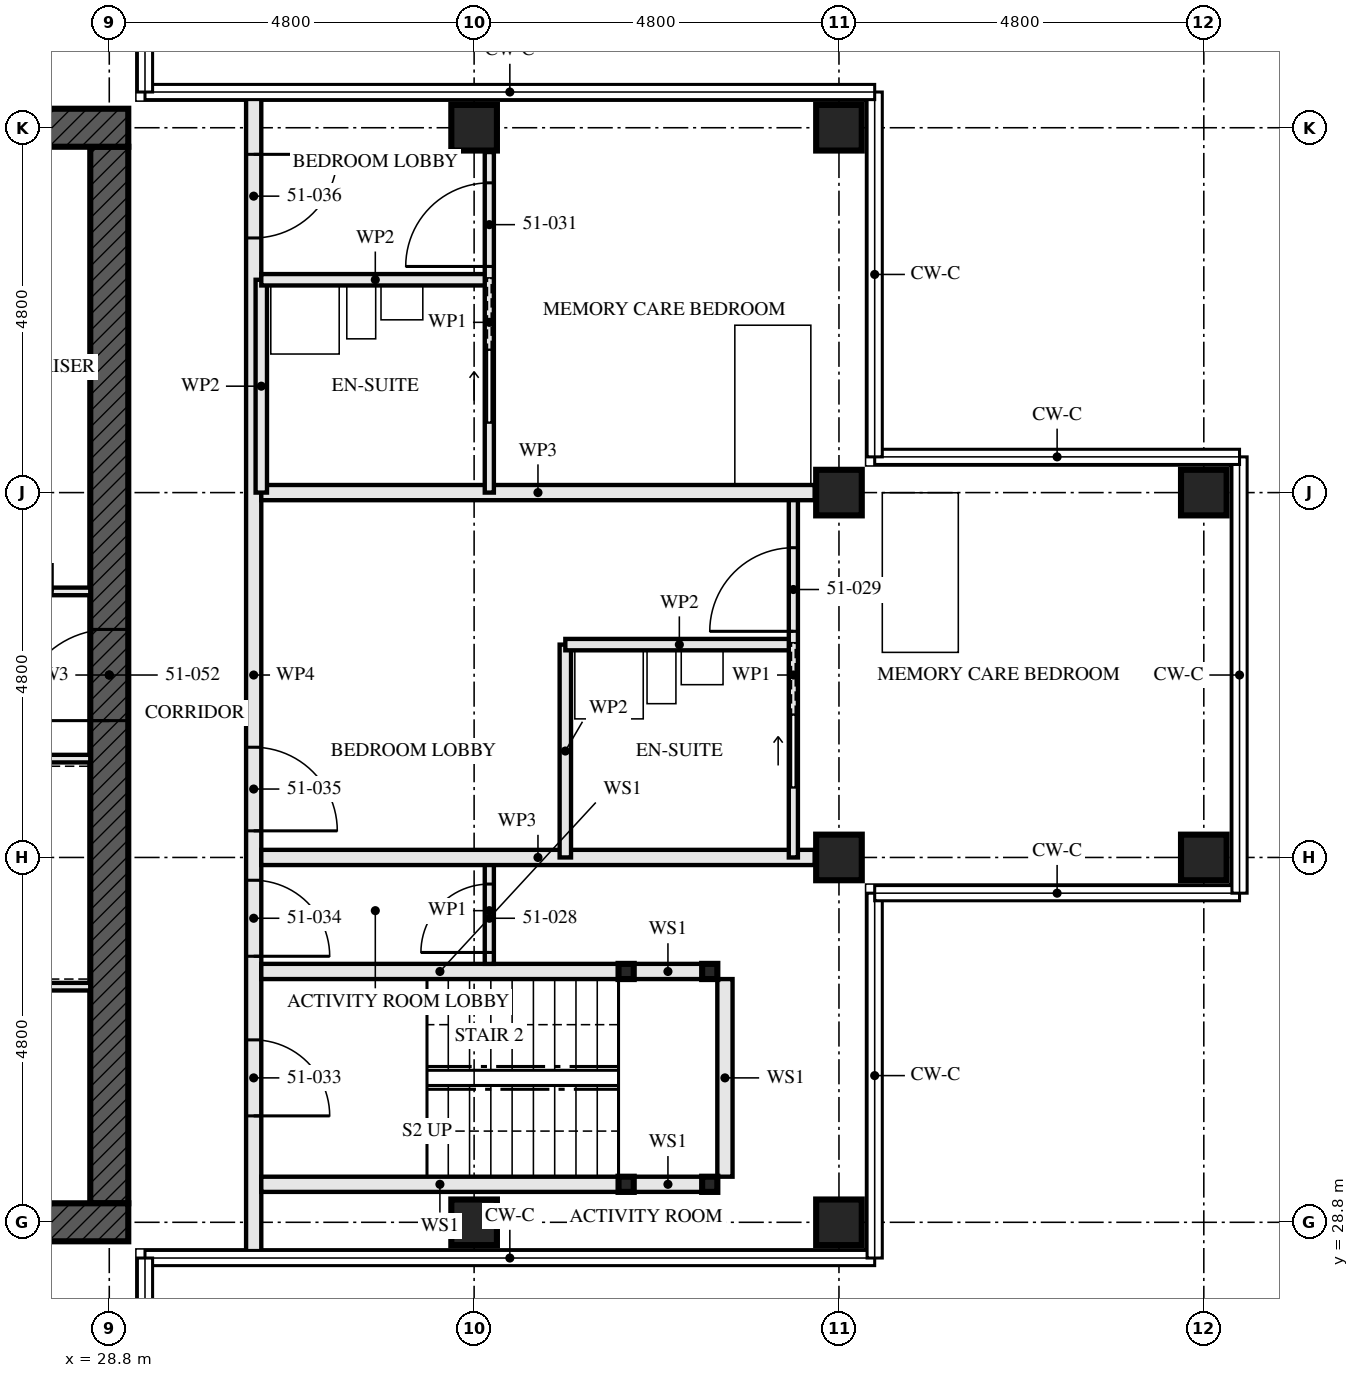
"""IFC4 building model, lengths in metres.
Left out: names, types, materials, properties, quantities, classifications, styles, units other than length and angle.
Written with IfcOpenShell. Run it as: python <this file> out.ifc"""

import sys

from ifc_helpers import new_model, si_unit, direction, frame, frame_2d, origin, origin_2d, place, context, subcontext, project, spatial, rectangle, hollow_rectangle, extrude, element, fill, save


model = new_model("IFC4")
c1 = context("Model", 3, precision=1e-05, world=origin(), true_north=direction((0.0, 1.0)))
c2 = subcontext(c1, "Body", "Model", "MODEL_VIEW")
j1 = project(units=[si_unit("LENGTHUNIT", "METRE"), si_unit("PLANEANGLEUNIT", "RADIAN")], contexts=[c1])
p1 = place(None, origin())
s1 = spatial("IfcSite", under=j1, at=p1, CompositionType="ELEMENT")
p2 = place(p1, origin())
s2 = spatial("IfcBuilding", under=s1, at=p2, CompositionType="ELEMENT")
p3 = place(p2, frame((0.0, 0.0, 186.5)))
s3 = spatial("IfcBuildingStorey", under=s2, at=p3, CompositionType="ELEMENT", Elevation=186.5)
for number, where, z_axis, x_axis in (
    (1, (33.6, 28.8, 0.0), (0.0, 0.0, 1.0), (0.0, 1.0, 0.0)),
    (2, (33.6, 43.2, 0.0), (0.0, 0.0, 1.0), (0.0, 1.0, 0.0)),
    (3, (38.4, 28.8, 0.0), (0.0, 0.0, 1.0), (0.0, 1.0, 0.0)),
    (4, (38.4, 33.6, 0.0), (0.0, 0.0, 1.0), (0.0, 1.0, 0.0)),
    (5, (38.4, 38.4, 0.0), (0.0, 0.0, 1.0), (0.0, 1.0, 0.0)),
    (6, (38.4, 43.2, 0.0), (0.0, 0.0, 1.0), (0.0, 1.0, 0.0)),
    (7, (43.2, 33.6, 0.0), (0.0, 0.0, 1.0), (0.0, 1.0, 0.0)),
    (8, (43.2, 38.4, 0.0), (0.0, 0.0, 1.0), (0.0, 1.0, 0.0)),
):
    element("IfcColumn", number, at=place(p3, frame(where, z_axis=z_axis, x_axis=x_axis)), inside=s3, PredefinedType="COLUMN", context=c2, shape_type="SweptSolid", body=[
        extrude(hollow_rectangle(XDim=0.6, YDim=0.6, WallThickness=0.08, at=origin_2d()), origin(), (0.0, 0.0, 1.0), 3.5),
    ])
p4 = place(p3, frame((14.15, 28.8, -0.17), z_axis=(0.0, 0.0, 1.0), x_axis=(1.0, 0.0, 0.0)))
e9 = element("IfcWall", 9, at=p4, inside=s3, PredefinedType="SHEAR", context=c2, shape_type="SweptSolid", body=[
    extrude(rectangle(XDim=14.9, YDim=0.5, at=frame_2d((7.45, 0.0))), origin(), (0.0, 0.0, 1.0), 3.42),
])
p5 = place(p4, frame((6.85, 0.0, 0.17)))
e10 = element("IfcOpeningElement", 10, at=p5, cuts=e9, PredefinedType="OPENING", context=c2, shape_type="SweptSolid", body=[
    extrude(rectangle(XDim=1.2, YDim=2.1, at=frame_2d((0.6, 1.05))), frame((0.0, 0.26, 0.0), z_axis=(0.0, -1.0, 0.0), x_axis=(1.0, 0.0, 0.0)), (0.0, 0.0, 1.0), 0.521),
])
p6 = place(p3, frame((29.05, 43.2, -0.17), z_axis=(0.0, 0.0, 1.0), x_axis=(-1.0, 0.0, 0.0)))
e11 = element("IfcWall", 11, at=p6, inside=s3, PredefinedType="SHEAR", context=c2, shape_type="SweptSolid", body=[
    extrude(rectangle(XDim=14.9, YDim=0.5, at=frame_2d((7.45, 0.0))), origin(), (0.0, 0.0, 1.0), 3.42),
])
p7 = place(p6, frame((6.85, 0.0, 0.17)))
e12 = element("IfcOpeningElement", 12, at=p7, cuts=e11, PredefinedType="OPENING", context=c2, shape_type="SweptSolid", body=[
    extrude(rectangle(XDim=1.2, YDim=2.1, at=frame_2d((0.6, 1.05))), frame((0.0, 0.26, 0.0), z_axis=(0.0, -1.0, 0.0), x_axis=(1.0, 0.0, 0.0)), (0.0, 0.0, 1.0), 0.521),
])
p8 = place(p3, frame((28.8, 29.05, -0.17), z_axis=(0.0, 0.0, 1.0), x_axis=(0.0, 1.0, 0.0)))
e13 = element("IfcWall", 13, at=p8, inside=s3, PredefinedType="SHEAR", context=c2, shape_type="SweptSolid", body=[
    extrude(rectangle(XDim=13.9, YDim=0.5, at=frame_2d((6.95, 0.0))), origin(), (0.0, 0.0, 1.0), 3.42),
])
p9 = place(p8, frame((6.35, 0.0, 0.17)))
e14 = element("IfcOpeningElement", 14, at=p9, cuts=e13, PredefinedType="OPENING", context=c2, shape_type="SweptSolid", body=[
    extrude(rectangle(XDim=1.2, YDim=2.1, at=frame_2d((0.6, 1.05))), frame((0.0, 0.26, 0.0), z_axis=(0.0, -1.0, 0.0), x_axis=(1.0, 0.0, 0.0)), (0.0, 0.0, 1.0), 0.521),
])
for number, where, z_axis, x_axis in (
    (15, (36.7, 29.3, 0.0), (0.0, 0.0, 1.0), (1.0, 0.0, 0.0)),
    (16, (36.7, 32.1, 0.0), (0.0, 0.0, 1.0), (1.0, 0.0, 0.0)),
    (17, (35.6, 29.3, 0.0), (0.0, 0.0, 1.0), (1.0, 0.0, 0.0)),
    (18, (35.6, 32.1, 0.0), (0.0, 0.0, 1.0), (1.0, 0.0, 0.0)),
):
    element("IfcColumn", number, at=place(p3, frame(where, z_axis=z_axis, x_axis=x_axis)), inside=s3, PredefinedType="COLUMN", context=c2, shape_type="SweptSolid", body=[
        extrude(hollow_rectangle(XDim=0.2, YDim=0.2, WallThickness=0.008, at=origin_2d()), origin(), (0.0, 0.0, 1.0), 3.25),
    ])
p10 = place(p3, frame((36.6, 29.3, 0.0), z_axis=(0.0, 0.0, 1.0), x_axis=(-1.0, 0.0, 0.0)))
e19 = element("IfcWall", 19, at=p10, inside=s3, PredefinedType="SOLIDWALL", context=c2, shape_type="SweptSolid", body=[
    extrude(rectangle(XDim=0.9, YDim=0.2, at=frame_2d((0.45, 0.0))), origin(), (0.0, 0.0, 1.0), 2.94),
])
p11 = place(p3, frame((35.5, 29.3, 0.0), z_axis=(0.0, 0.0, 1.0), x_axis=(-1.0, 0.0, 0.0)))
e20 = element("IfcWall", 20, at=p11, inside=s3, PredefinedType="SOLIDWALL", context=c2, shape_type="SweptSolid", body=[
    extrude(rectangle(XDim=4.7, YDim=0.2, at=frame_2d((2.35, 0.0))), origin(), (0.0, 0.0, 1.0), 2.94),
])
p12 = place(p3, frame((36.6, 32.1, 0.0), z_axis=(0.0, 0.0, 1.0), x_axis=(-1.0, 0.0, 0.0)))
e21 = element("IfcWall", 21, at=p12, inside=s3, PredefinedType="SOLIDWALL", context=c2, shape_type="SweptSolid", body=[
    extrude(rectangle(XDim=0.9, YDim=0.2, at=frame_2d((0.45, 0.0))), origin(), (0.0, 0.0, 1.0), 2.94),
])
p13 = place(p3, frame((35.5, 32.1, 0.0), z_axis=(0.0, 0.0, 1.0), x_axis=(-1.0, 0.0, 0.0)))
e22 = element("IfcWall", 22, at=p13, inside=s3, PredefinedType="SOLIDWALL", context=c2, shape_type="SweptSolid", body=[
    extrude(rectangle(XDim=4.7, YDim=0.2, at=frame_2d((2.35, 0.0))), origin(), (0.0, 0.0, 1.0), 2.94),
])
p14 = place(p3, frame((36.9, 29.4, 0.0), z_axis=(0.0, 0.0, 1.0), x_axis=(0.0, 1.0, 0.0)))
e23 = element("IfcWall", 23, at=p14, inside=s3, PredefinedType="SOLIDWALL", context=c2, shape_type="SweptSolid", body=[
    extrude(rectangle(XDim=2.6, YDim=0.2, at=frame_2d((1.3, 0.0))), origin(), (0.0, 0.0, 1.0), 3.25),
])
p15 = place(p3, frame((33.8, 32.2, 0.0), z_axis=(0.0, 0.0, 1.0), x_axis=(0.0, 1.0, 0.0)))
e24 = element("IfcWall", 24, at=p15, inside=s3, PredefinedType="PARTITIONING", context=c2, shape_type="SweptSolid", body=[
    extrude(rectangle(XDim=1.4, YDim=0.12, at=frame_2d((0.7, 0.0))), origin(), (0.0, 0.0, 1.0), 3.25),
])
p16 = place(p15, frame((0.15, 0.0, 0.0)))
e25 = element("IfcOpeningElement", 25, at=p16, cuts=e24, PredefinedType="OPENING", context=c2, shape_type="SweptSolid", body=[
    extrude(rectangle(XDim=0.9, YDim=2.1, at=frame_2d((0.45, 1.05))), frame((0.0, 0.071, 0.0), z_axis=(0.0, -1.0, 0.0), x_axis=(1.0, 0.0, 0.0)), (0.0, 0.0, 1.0), 0.141),
])
p17 = place(p3, frame((38.08, 33.6, 0.0), z_axis=(0.0, 0.0, 1.0), x_axis=(-1.0, 0.0, 0.0)))
e26 = element("IfcWall", 26, at=p17, inside=s3, PredefinedType="PARTITIONING", context=c2, shape_type="SweptSolid", body=[
    extrude(rectangle(XDim=7.28, YDim=0.2, at=frame_2d((3.64, 0.0))), origin(), (0.0, 0.0, 1.0), 2.24),
])
p18 = place(p3, frame((37.8, 36.4, 0.0), z_axis=(0.0, 0.0, 1.0), x_axis=(-1.0, 0.0, 0.0)))
e27 = element("IfcWall", 27, at=p18, inside=s3, PredefinedType="PARTITIONING", context=c2, shape_type="SweptSolid", body=[
    extrude(rectangle(XDim=3.0, YDim=0.15, at=frame_2d((1.5, 0.0))), origin(), (0.0, 0.0, 1.0), 3.25),
])
p19 = place(p3, frame((34.8, 33.6, 0.0), z_axis=(0.0, 0.0, 1.0), x_axis=(0.0, 1.0, 0.0)))
e28 = element("IfcWall", 28, at=p19, inside=s3, PredefinedType="PARTITIONING", context=c2, shape_type="SweptSolid", body=[
    extrude(rectangle(XDim=2.8, YDim=0.15, at=frame_2d((1.4, 0.0))), origin(), (0.0, 0.0, 1.0), 3.25),
])
p20 = place(p3, frame((37.8, 33.6, 0.0), z_axis=(0.0, 0.0, 1.0), x_axis=(0.0, 1.0, 0.0)))
e29 = element("IfcWall", 29, at=p20, inside=s3, PredefinedType="PARTITIONING", context=c2, shape_type="SweptSolid", body=[
    extrude(rectangle(XDim=4.8, YDim=0.12, at=frame_2d((2.4, 0.0))), origin(), (0.0, 0.0, 1.0), 3.25),
])
p21 = place(p20, frame((2.975, 0.0, 0.0)))
e30 = element("IfcOpeningElement", 30, at=p21, cuts=e29, PredefinedType="OPENING", context=c2, shape_type="SweptSolid", body=[
    extrude(rectangle(XDim=1.1, YDim=2.1, at=frame_2d((0.55, 1.05))), frame((0.0, 0.071, 0.0), z_axis=(0.0, -1.0, 0.0), x_axis=(1.0, 0.0, 0.0)), (0.0, 0.0, 1.0), 0.141),
])
p22 = place(p20, frame((0.925, 0.0, 0.0)))
e31 = element("IfcOpeningElement", 31, at=p22, cuts=e29, PredefinedType="OPENING", context=c2, shape_type="SweptSolid", body=[
    extrude(rectangle(XDim=0.95, YDim=2.1, at=frame_2d((0.475, 1.05))), frame((0.0, 0.071, 0.0), z_axis=(0.0, -1.0, 0.0), x_axis=(1.0, 0.0, 0.0)), (0.0, 0.0, 1.0), 0.141),
])
p23 = place(p3, frame((38.08, 38.4, 0.0), z_axis=(0.0, 0.0, 1.0), x_axis=(-1.0, 0.0, 0.0)))
e32 = element("IfcWall", 32, at=p23, inside=s3, PredefinedType="PARTITIONING", context=c2, shape_type="SweptSolid", body=[
    extrude(rectangle(XDim=7.28, YDim=0.2, at=frame_2d((3.64, 0.0))), origin(), (0.0, 0.0, 1.0), 2.24),
])
p24 = place(p3, frame((33.8, 41.2, 0.0), z_axis=(0.0, 0.0, 1.0), x_axis=(-1.0, 0.0, 0.0)))
e33 = element("IfcWall", 33, at=p24, inside=s3, PredefinedType="PARTITIONING", context=c2, shape_type="SweptSolid", body=[
    extrude(rectangle(XDim=3.0, YDim=0.15, at=frame_2d((1.5, 0.0))), origin(), (0.0, 0.0, 1.0), 3.25),
])
p25 = place(p3, frame((30.8, 38.4, 0.0), z_axis=(0.0, 0.0, 1.0), x_axis=(0.0, 1.0, 0.0)))
e34 = element("IfcWall", 34, at=p25, inside=s3, PredefinedType="PARTITIONING", context=c2, shape_type="SweptSolid", body=[
    extrude(rectangle(XDim=2.8, YDim=0.15, at=frame_2d((1.4, 0.0))), origin(), (0.0, 0.0, 1.0), 3.25),
])
p26 = place(p3, frame((33.8, 38.4, 0.0), z_axis=(0.0, 0.0, 1.0), x_axis=(0.0, 1.0, 0.0)))
e35 = element("IfcWall", 35, at=p26, inside=s3, PredefinedType="PARTITIONING", context=c2, shape_type="SweptSolid", body=[
    extrude(rectangle(XDim=4.48, YDim=0.12, at=frame_2d((2.24, 0.0))), origin(), (0.0, 0.0, 1.0), 3.25),
])
p27 = place(p26, frame((2.975, 0.0, 0.0)))
e36 = element("IfcOpeningElement", 36, at=p27, cuts=e35, PredefinedType="OPENING", context=c2, shape_type="SweptSolid", body=[
    extrude(rectangle(XDim=1.1, YDim=2.1, at=frame_2d((0.55, 1.05))), frame((0.0, 0.071, 0.0), z_axis=(0.0, -1.0, 0.0), x_axis=(1.0, 0.0, 0.0)), (0.0, 0.0, 1.0), 0.141),
])
p28 = place(p26, frame((0.925, 0.0, 0.0)))
e37 = element("IfcOpeningElement", 37, at=p28, cuts=e35, PredefinedType="OPENING", context=c2, shape_type="SweptSolid", body=[
    extrude(rectangle(XDim=0.95, YDim=2.1, at=frame_2d((0.475, 1.05))), frame((0.0, 0.071, 0.0), z_axis=(0.0, -1.0, 0.0), x_axis=(1.0, 0.0, 0.0)), (0.0, 0.0, 1.0), 0.141),
])
p29 = place(p3, frame((30.7, 28.35, 0.0), z_axis=(0.0, 0.0, 1.0), x_axis=(0.0, 1.0, 0.0)))
e38 = element("IfcWall", 38, at=p29, inside=s3, PredefinedType="PARTITIONING", context=c2, shape_type="SweptSolid", body=[
    extrude(rectangle(XDim=15.3, YDim=0.2, at=frame_2d((7.65, 0.0))), origin(), (0.0, 0.0, 1.0), 2.04),
])
p30 = place(p29, frame((1.85, 0.0, 0.0)))
e39 = element("IfcOpeningElement", 39, at=p30, cuts=e38, PredefinedType="OPENING", context=c2, shape_type="SweptSolid", body=[
    extrude(rectangle(XDim=1.0, YDim=2.0, at=frame_2d((0.5, 1.0))), frame((0.0, 0.111, 0.0), z_axis=(0.0, -1.0, 0.0), x_axis=(1.0, 0.0, 0.0)), (0.0, 0.0, 1.0), 0.221),
])
p31 = place(p29, frame((3.95, 0.0, 0.0)))
e40 = element("IfcOpeningElement", 40, at=p31, cuts=e38, PredefinedType="OPENING", context=c2, shape_type="SweptSolid", body=[
    extrude(rectangle(XDim=1.0, YDim=2.0, at=frame_2d((0.5, 1.0))), frame((0.0, 0.111, 0.0), z_axis=(0.0, -1.0, 0.0), x_axis=(1.0, 0.0, 0.0)), (0.0, 0.0, 1.0), 0.221),
])
p32 = place(p29, frame((5.6, 0.0, 0.0)))
e41 = element("IfcOpeningElement", 41, at=p32, cuts=e38, PredefinedType="OPENING", context=c2, shape_type="SweptSolid", body=[
    extrude(rectangle(XDim=1.1, YDim=2.0, at=frame_2d((0.55, 1.0))), frame((0.0, 0.111, 0.0), z_axis=(0.0, -1.0, 0.0), x_axis=(1.0, 0.0, 0.0)), (0.0, 0.0, 1.0), 0.221),
])
p33 = place(p29, frame((13.4, 0.0, 0.0)))
e42 = element("IfcOpeningElement", 42, at=p33, cuts=e38, PredefinedType="OPENING", context=c2, shape_type="SweptSolid", body=[
    extrude(rectangle(XDim=1.1, YDim=2.0, at=frame_2d((0.55, 1.0))), frame((0.0, 0.111, 0.0), z_axis=(0.0, -1.0, 0.0), x_axis=(1.0, 0.0, 0.0)), (0.0, 0.0, 1.0), 0.221),
])
p34 = place(p3, frame((23.05, 34.9, 0.0), z_axis=(0.0, 0.0, 1.0), x_axis=(1.0, 0.0, 0.0)))
e43 = element("IfcWall", 43, at=p34, inside=s3, PredefinedType="SOLIDWALL", context=c2, shape_type="SweptSolid", body=[
    extrude(rectangle(XDim=5.5, YDim=0.1, at=frame_2d((2.75, 0.0))), origin(), (0.0, 0.0, 1.0), 3.25),
])
p35 = place(p34, frame((0.85, 0.0, 0.0)))
e44 = element("IfcOpeningElement", 44, at=p35, cuts=e43, PredefinedType="OPENING", context=c2, shape_type="SweptSolid", body=[
    extrude(rectangle(XDim=1.0, YDim=2.1, at=frame_2d((0.5, 1.05))), frame((0.0, 0.061, 0.0), z_axis=(0.0, -1.0, 0.0), x_axis=(1.0, 0.0, 0.0)), (0.0, 0.0, 1.0), 0.121),
])
p36 = place(p34, frame((3.625, 0.0, 0.0)))
e45 = element("IfcOpeningElement", 45, at=p36, cuts=e43, PredefinedType="OPENING", context=c2, shape_type="SweptSolid", body=[
    extrude(rectangle(XDim=1.0, YDim=2.1, at=frame_2d((0.5, 1.05))), frame((0.0, 0.061, 0.0), z_axis=(0.0, -1.0, 0.0), x_axis=(1.0, 0.0, 0.0)), (0.0, 0.0, 1.0), 0.121),
])
p37 = place(p3, frame((22.65, 37.1, 0.0), z_axis=(0.0, 0.0, 1.0), x_axis=(1.0, 0.0, 0.0)))
e46 = element("IfcWall", 46, at=p37, inside=s3, PredefinedType="SOLIDWALL", context=c2, shape_type="SweptSolid", body=[
    extrude(rectangle(XDim=5.9, YDim=0.1, at=frame_2d((2.95, 0.0))), origin(), (0.0, 0.0, 1.0), 3.25),
])
p38 = place(p37, frame((3.15, 0.0, 0.0)))
e47 = element("IfcOpeningElement", 47, at=p38, cuts=e46, PredefinedType="OPENING", context=c2, shape_type="SweptSolid", body=[
    extrude(rectangle(XDim=0.9, YDim=2.1, at=frame_2d((0.45, 1.05))), frame((0.0, 0.061, 0.0), z_axis=(0.0, -1.0, 0.0), x_axis=(1.0, 0.0, 0.0)), (0.0, 0.0, 1.0), 0.121),
])
p39 = place(p37, frame((4.7, 0.0, 0.0)))
e48 = element("IfcOpeningElement", 48, at=p39, cuts=e46, PredefinedType="OPENING", context=c2, shape_type="SweptSolid", body=[
    extrude(rectangle(XDim=0.7, YDim=2.1, at=frame_2d((0.35, 1.05))), frame((0.0, 0.061, 0.0), z_axis=(0.0, -1.0, 0.0), x_axis=(1.0, 0.0, 0.0)), (0.0, 0.0, 1.0), 0.121),
])
p40 = place(p3, frame((23.15, 31.9, 0.0), z_axis=(0.0, 0.0, 1.0), x_axis=(1.0, 0.0, 0.0)))
e49 = element("IfcWall", 49, at=p40, inside=s3, PredefinedType="SOLIDWALL", context=c2, shape_type="SweptSolid", body=[
    extrude(rectangle(XDim=5.4, YDim=0.1, at=frame_2d((2.7, 0.0))), origin(), (0.0, 0.0, 1.0), 3.25),
])
p41 = place(p16, origin())
e50 = element("IfcDoor", 50, at=p41, inside=s3, OperationType="SINGLE_SWING_RIGHT", PredefinedType="DOOR", context=c2, shape_type="SweptSolid", body=[
    extrude(rectangle(XDim=0.9, YDim=2.1, at=frame_2d((0.45, 1.05))), frame((0.0, 0.022, 0.0), z_axis=(0.0, -1.0, 0.0), x_axis=(1.0, 0.0, 0.0)), (0.0, 0.0, 1.0), 0.044),
])
fill(e25, e50)
p42 = place(p21, origin())
e51 = element("IfcDoor", 51, at=p42, inside=s3, OperationType="SINGLE_SWING_RIGHT", PredefinedType="DOOR", context=c2, shape_type="SweptSolid", body=[
    extrude(rectangle(XDim=1.1, YDim=2.1, at=frame_2d((0.55, 1.05))), frame((0.0, 0.022, 0.0), z_axis=(0.0, -1.0, 0.0), x_axis=(1.0, 0.0, 0.0)), (0.0, 0.0, 1.0), 0.044),
])
fill(e30, e51)
p43 = place(p22, origin())
e52 = element("IfcDoor", 52, at=p43, inside=s3, OperationType="SLIDING_TO_LEFT", PredefinedType="DOOR", context=c2, shape_type="SweptSolid", body=[
    extrude(rectangle(XDim=0.95, YDim=2.1, at=frame_2d((0.475, 1.05))), frame((0.0, 0.022, 0.0), z_axis=(0.0, -1.0, 0.0), x_axis=(1.0, 0.0, 0.0)), (0.0, 0.0, 1.0), 0.044),
])
fill(e31, e52)
p44 = place(p27, origin())
e53 = element("IfcDoor", 53, at=p44, inside=s3, OperationType="SINGLE_SWING_RIGHT", PredefinedType="DOOR", context=c2, shape_type="SweptSolid", body=[
    extrude(rectangle(XDim=1.1, YDim=2.1, at=frame_2d((0.55, 1.05))), frame((0.0, 0.022, 0.0), z_axis=(0.0, -1.0, 0.0), x_axis=(1.0, 0.0, 0.0)), (0.0, 0.0, 1.0), 0.044),
])
fill(e36, e53)
p45 = place(p28, origin())
e54 = element("IfcDoor", 54, at=p45, inside=s3, OperationType="SLIDING_TO_LEFT", PredefinedType="DOOR", context=c2, shape_type="SweptSolid", body=[
    extrude(rectangle(XDim=0.95, YDim=2.1, at=frame_2d((0.475, 1.05))), frame((0.0, 0.022, 0.0), z_axis=(0.0, -1.0, 0.0), x_axis=(1.0, 0.0, 0.0)), (0.0, 0.0, 1.0), 0.044),
])
fill(e37, e54)
p46 = place(p30, frame((1.0, 0.0, 0.0), z_axis=(0.0, 0.0, 1.0), x_axis=(-1.0, 0.0, 0.0)))
e55 = element("IfcDoor", 55, at=p46, inside=s3, OperationType="SINGLE_SWING_LEFT", PredefinedType="DOOR", context=c2, shape_type="SweptSolid", body=[
    extrude(rectangle(XDim=1.0, YDim=2.0, at=frame_2d((0.5, 1.0))), frame((0.0, 0.032, 0.0), z_axis=(0.0, -1.0, 0.0), x_axis=(1.0, 0.0, 0.0)), (0.0, 0.0, 1.0), 0.064),
])
fill(e39, e55)
p47 = place(p31, frame((1.0, 0.0, 0.0), z_axis=(0.0, 0.0, 1.0), x_axis=(-1.0, 0.0, 0.0)))
e56 = element("IfcDoor", 56, at=p47, inside=s3, OperationType="SINGLE_SWING_LEFT", PredefinedType="DOOR", context=c2, shape_type="SweptSolid", body=[
    extrude(rectangle(XDim=1.0, YDim=2.0, at=frame_2d((0.5, 1.0))), frame((0.0, 0.027, 0.0), z_axis=(0.0, -1.0, 0.0), x_axis=(1.0, 0.0, 0.0)), (0.0, 0.0, 1.0), 0.054),
])
fill(e40, e56)
p48 = place(p32, frame((1.1, 0.0, 0.0), z_axis=(0.0, 0.0, 1.0), x_axis=(-1.0, 0.0, 0.0)))
e57 = element("IfcDoor", 57, at=p48, inside=s3, OperationType="SINGLE_SWING_LEFT", PredefinedType="DOOR", context=c2, shape_type="SweptSolid", body=[
    extrude(rectangle(XDim=1.1, YDim=2.0, at=frame_2d((0.55, 1.0))), frame((0.0, 0.027, 0.0), z_axis=(0.0, -1.0, 0.0), x_axis=(1.0, 0.0, 0.0)), (0.0, 0.0, 1.0), 0.054),
])
fill(e41, e57)
p49 = place(p33, frame((1.1, 0.0, 0.0), z_axis=(0.0, 0.0, 1.0), x_axis=(-1.0, 0.0, 0.0)))
e58 = element("IfcDoor", 58, at=p49, inside=s3, OperationType="SINGLE_SWING_RIGHT", PredefinedType="DOOR", context=c2, shape_type="SweptSolid", body=[
    extrude(rectangle(XDim=1.1, YDim=2.0, at=frame_2d((0.55, 1.0))), frame((0.0, 0.027, 0.0), z_axis=(0.0, -1.0, 0.0), x_axis=(1.0, 0.0, 0.0)), (0.0, 0.0, 1.0), 0.054),
])
fill(e42, e58)
p50 = place(p9, origin())
e59 = element("IfcDoor", 59, at=p50, inside=s3, OperationType="SINGLE_SWING_LEFT", PredefinedType="DOOR", context=c2, shape_type="SweptSolid", body=[
    extrude(rectangle(XDim=1.2, YDim=2.1, at=frame_2d((0.6, 1.05))), frame((0.0, 0.027, 0.0), z_axis=(0.0, -1.0, 0.0), x_axis=(1.0, 0.0, 0.0)), (0.0, 0.0, 1.0), 0.054),
])
fill(e14, e59)
save(model, sys.argv[1])
